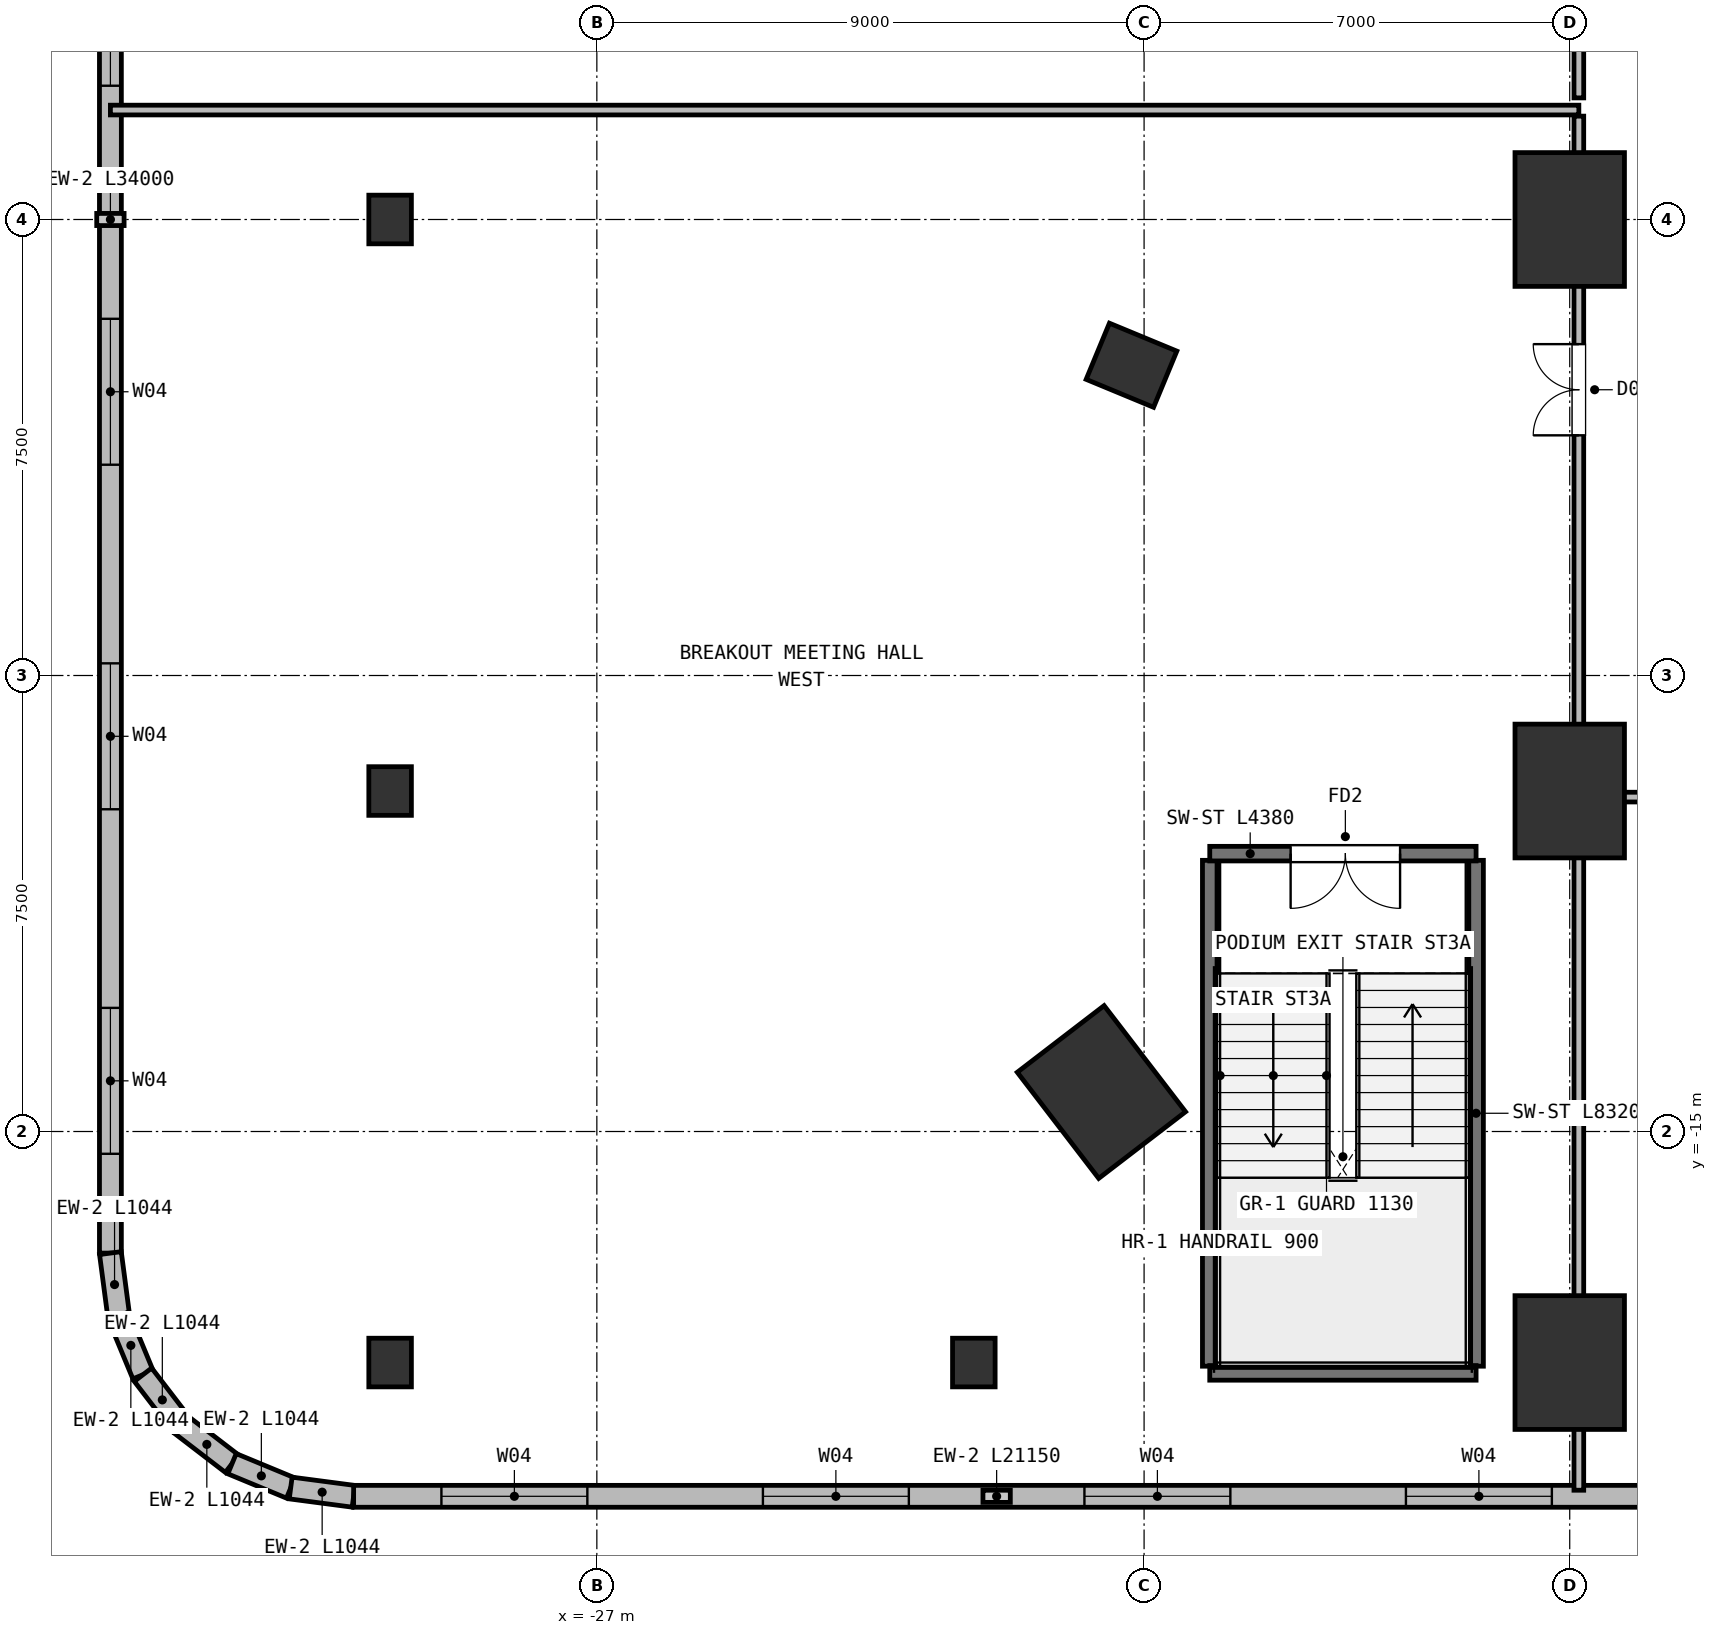
"""IFC4 building model, lengths in metres.
Left out: names, types, materials, properties, quantities, classifications, styles, units other than length and angle.
Written with IfcOpenShell. Run it as: python <this file> out.ifc"""

import sys

from ifc_helpers import new_model, si_unit, direction, frame, frame_2d, origin, origin_2d, place, context, subcontext, project, spatial, rectangle, extrude, element, fill, save


model = new_model("IFC4")
c1 = context("Model", 3, precision=1e-05, world=origin(), true_north=direction((0.0, 1.0)))
c2 = subcontext(c1, "Body", "Model", "MODEL_VIEW")
j1 = project(units=[si_unit("LENGTHUNIT", "METRE"), si_unit("PLANEANGLEUNIT", "RADIAN")], contexts=[c1])
p1 = place(None, origin())
s1 = spatial("IfcSite", under=j1, at=p1, CompositionType="ELEMENT")
p2 = place(p1, origin())
s2 = spatial("IfcBuilding", under=s1, at=p2, CompositionType="ELEMENT")
p3 = place(p2, frame((0.0, 0.0, 21.5)))
s3 = spatial("IfcBuildingStorey", under=s2, at=p3, CompositionType="ELEMENT", Elevation=21.5)
p4 = place(p3, frame((-18.207, -2.397, 0.0), z_axis=(0.0, 0.0, 1.0), x_axis=(0.382683432365, 0.923879532511, 0.0)))
e1 = element("IfcColumn", 1, at=p4, inside=s3, PredefinedType="COLUMN", context=c2, shape_type="SweptSolid", body=[
    extrude(rectangle(XDim=1.0, YDim=1.2, at=origin_2d()), origin(), (0.0, 0.0, 1.0), 4.5),
])
p5 = place(p3, frame((-18.702, -14.351, 0.0), z_axis=(0.0, 0.0, 1.0), x_axis=(0.793353340291, 0.608761429009, 0.0)))
e2 = element("IfcColumn", 2, at=p5, inside=s3, PredefinedType="COLUMN", context=c2, shape_type="SweptSolid", body=[
    extrude(rectangle(XDim=1.8, YDim=2.2, at=origin_2d()), origin(), (0.0, 0.0, 1.0), 4.5),
])
for number, where, z_axis, x_axis in (
    (3, (-30.4, -18.8, 0.0), (0.0, 0.0, 1.0), (1.0, 0.0, 0.0)),
    (4, (-30.4, -9.4, 0.0), (0.0, 0.0, 1.0), (1.0, 0.0, 0.0)),
    (5, (-30.4, 0.0, 0.0), (0.0, 0.0, 1.0), (1.0, 0.0, 0.0)),
    (6, (-20.8, -18.8, 0.0), (0.0, 0.0, 1.0), (1.0, 0.0, 0.0)),
):
    element("IfcColumn", number, at=place(p3, frame(where, z_axis=z_axis, x_axis=x_axis)), inside=s3, PredefinedType="COLUMN", context=c2, shape_type="SweptSolid", body=[
        extrude(rectangle(XDim=0.7, YDim=0.8, at=origin_2d()), origin(), (0.0, 0.0, 1.0), 4.5),
    ])
for number, where, z_axis, x_axis in (
    (7, (-11.0, -18.8, 0.0), (0.0, 0.0, 1.0), (1.0, 0.0, 0.0)),
    (8, (-11.0, -9.4, 0.0), (0.0, 0.0, 1.0), (1.0, 0.0, 0.0)),
    (9, (-11.0, 0.0, 0.0), (0.0, 0.0, 1.0), (1.0, 0.0, 0.0)),
):
    element("IfcColumn", number, at=place(p3, frame(where, z_axis=z_axis, x_axis=x_axis)), inside=s3, PredefinedType="COLUMN", context=c2, shape_type="SweptSolid", body=[
        extrude(rectangle(XDim=1.8, YDim=2.2, at=origin_2d()), origin(), (0.0, 0.0, 1.0), 4.5),
    ])
p6 = place(p3, frame((-35.0, -17.0, 0.0), z_axis=(0.0, 0.0, 1.0), x_axis=(0.0, 1.0, 0.0)))
e10 = element("IfcWall", 10, at=p6, inside=s3, PredefinedType="SOLIDWALL", context=c2, shape_type="SweptSolid", body=[
    extrude(rectangle(XDim=34.0, YDim=0.36, at=frame_2d((17.0, 0.0))), origin(), (0.0, 0.0, 1.0), 4.22),
])
p7 = place(p6, frame((1.633, 0.0, 0.95)))
e11 = element("IfcOpeningElement", 11, at=p7, cuts=e10, PredefinedType="OPENING", context=c2, shape_type="SweptSolid", body=[
    extrude(rectangle(XDim=2.4, YDim=2.6, at=frame_2d((1.2, 1.3))), frame((0.0, 0.19, 0.0), z_axis=(0.0, -1.0, 0.0), x_axis=(1.0, 0.0, 0.0)), (0.0, 0.0, 1.0), 0.38),
])
p8 = place(p6, frame((7.3, 0.0, 0.95)))
e12 = element("IfcOpeningElement", 12, at=p8, cuts=e10, PredefinedType="OPENING", context=c2, shape_type="SweptSolid", body=[
    extrude(rectangle(XDim=2.4, YDim=2.6, at=frame_2d((1.2, 1.3))), frame((0.0, 0.19, 0.0), z_axis=(0.0, -1.0, 0.0), x_axis=(1.0, 0.0, 0.0)), (0.0, 0.0, 1.0), 0.38),
])
p9 = place(p6, frame((12.967, 0.0, 0.95)))
e13 = element("IfcOpeningElement", 13, at=p9, cuts=e10, PredefinedType="OPENING", context=c2, shape_type="SweptSolid", body=[
    extrude(rectangle(XDim=2.4, YDim=2.6, at=frame_2d((1.2, 1.3))), frame((0.0, 0.19, 0.0), z_axis=(0.0, -1.0, 0.0), x_axis=(1.0, 0.0, 0.0)), (0.0, 0.0, 1.0), 0.38),
])
p10 = place(p6, frame((19.2, 0.0, 0.95)))
e14 = element("IfcOpeningElement", 14, at=p10, cuts=e10, PredefinedType="OPENING", context=c2, shape_type="SweptSolid", body=[
    extrude(rectangle(XDim=2.4, YDim=2.6, at=frame_2d((1.2, 1.3))), frame((0.0, 0.19, 0.0), z_axis=(0.0, -1.0, 0.0), x_axis=(1.0, 0.0, 0.0)), (0.0, 0.0, 1.0), 0.38),
])
p11 = place(p6, frame((24.3, 0.0, 0.95)))
e15 = element("IfcOpeningElement", 15, at=p11, cuts=e10, PredefinedType="OPENING", context=c2, shape_type="SweptSolid", body=[
    extrude(rectangle(XDim=2.4, YDim=2.6, at=frame_2d((1.2, 1.3))), frame((0.0, 0.19, 0.0), z_axis=(0.0, -1.0, 0.0), x_axis=(1.0, 0.0, 0.0)), (0.0, 0.0, 1.0), 0.38),
])
p12 = place(p6, frame((29.967, 0.0, 0.95)))
e16 = element("IfcOpeningElement", 16, at=p12, cuts=e10, PredefinedType="OPENING", context=c2, shape_type="SweptSolid", body=[
    extrude(rectangle(XDim=2.4, YDim=2.6, at=frame_2d((1.2, 1.3))), frame((0.0, 0.19, 0.0), z_axis=(0.0, -1.0, 0.0), x_axis=(1.0, 0.0, 0.0)), (0.0, 0.0, 1.0), 0.38),
])
p13 = place(p3, frame((-34.864, -18.035, 0.0), z_axis=(0.0, 0.0, 1.0), x_axis=(-0.130448465198, 0.991455091231, 0.0)))
e17 = element("IfcWall", 17, at=p13, inside=s3, PredefinedType="SOLIDWALL", context=c2, shape_type="SweptSolid", body=[
    extrude(rectangle(XDim=1.044, YDim=0.36, at=frame_2d((0.522, 0.0))), origin(), (0.0, 0.0, 1.0), 4.22),
])
for number, where, z_axis, x_axis in (
    (18, (-34.464, -19.0, 0.0), (0.0, 0.0, 1.0), (-0.383, 0.924, 0.0)),
    (19, (-33.828, -19.828, 0.0), (0.0, 0.0, 1.0), (-0.609, 0.793, 0.0)),
    (20, (-33.0, -20.464, 0.0), (0.0, 0.0, 1.0), (-0.793, 0.609, 0.0)),
    (21, (-32.035, -20.864, 0.0), (0.0, 0.0, 1.0), (-0.924, 0.383, 0.0)),
):
    element("IfcWall", number, at=place(p3, frame(where, z_axis=z_axis, x_axis=x_axis)), inside=s3, PredefinedType="SOLIDWALL", context=c2, shape_type="SweptSolid", body=[
        extrude(rectangle(XDim=1.044, YDim=0.36, at=frame_2d((0.522, 0.0))), origin(), (0.0, 0.0, 1.0), 4.22),
    ])
p14 = place(p3, frame((-31.0, -21.0, 0.0), z_axis=(0.0, 0.0, 1.0), x_axis=(-0.991455091231, 0.130448465198, 0.0)))
e22 = element("IfcWall", 22, at=p14, inside=s3, PredefinedType="SOLIDWALL", context=c2, shape_type="SweptSolid", body=[
    extrude(rectangle(XDim=1.044, YDim=0.36, at=frame_2d((0.522, 0.0))), origin(), (0.0, 0.0, 1.0), 4.22),
])
p15 = place(p3, frame((-9.85, -21.0, 0.0), z_axis=(0.0, 0.0, 1.0), x_axis=(-1.0, 0.0, 0.0)))
e23 = element("IfcWall", 23, at=p15, inside=s3, PredefinedType="SOLIDWALL", context=c2, shape_type="SweptSolid", body=[
    extrude(rectangle(XDim=21.15, YDim=0.36, at=frame_2d((10.575, 0.0))), origin(), (0.0, 0.0, 1.0), 4.22),
])
p16 = place(p15, frame((1.444, 0.0, 0.95)))
e24 = element("IfcOpeningElement", 24, at=p16, cuts=e23, PredefinedType="OPENING", context=c2, shape_type="SweptSolid", body=[
    extrude(rectangle(XDim=2.4, YDim=2.6, at=frame_2d((1.2, 1.3))), frame((0.0, 0.19, 0.0), z_axis=(0.0, -1.0, 0.0), x_axis=(1.0, 0.0, 0.0)), (0.0, 0.0, 1.0), 0.38),
])
p17 = place(p15, frame((6.731, 0.0, 0.95)))
e25 = element("IfcOpeningElement", 25, at=p17, cuts=e23, PredefinedType="OPENING", context=c2, shape_type="SweptSolid", body=[
    extrude(rectangle(XDim=2.4, YDim=2.6, at=frame_2d((1.2, 1.3))), frame((0.0, 0.19, 0.0), z_axis=(0.0, -1.0, 0.0), x_axis=(1.0, 0.0, 0.0)), (0.0, 0.0, 1.0), 0.38),
])
p18 = place(p15, frame((12.019, 0.0, 0.95)))
e26 = element("IfcOpeningElement", 26, at=p18, cuts=e23, PredefinedType="OPENING", context=c2, shape_type="SweptSolid", body=[
    extrude(rectangle(XDim=2.4, YDim=2.6, at=frame_2d((1.2, 1.3))), frame((0.0, 0.19, 0.0), z_axis=(0.0, -1.0, 0.0), x_axis=(1.0, 0.0, 0.0)), (0.0, 0.0, 1.0), 0.38),
])
p19 = place(p15, frame((17.306, 0.0, 0.95)))
e27 = element("IfcOpeningElement", 27, at=p19, cuts=e23, PredefinedType="OPENING", context=c2, shape_type="SweptSolid", body=[
    extrude(rectangle(XDim=2.4, YDim=2.6, at=frame_2d((1.2, 1.3))), frame((0.0, 0.19, 0.0), z_axis=(0.0, -1.0, 0.0), x_axis=(1.0, 0.0, 0.0)), (0.0, 0.0, 1.0), 0.38),
])
for number, where, z_axis, x_axis in (
    (28, (-16.92, -18.86, 0.0), (0.0, 0.0, 1.0), (0.0, 1.0, 0.0)),
    (29, (-12.54, -18.86, 0.0), (0.0, 0.0, 1.0), (0.0, 1.0, 0.0)),
):
    element("IfcWall", number, at=place(p3, frame(where, z_axis=z_axis, x_axis=x_axis)), inside=s3, PredefinedType="SHEAR", context=c2, shape_type="SweptSolid", body=[
        extrude(rectangle(XDim=8.32, YDim=0.24, at=frame_2d((4.16, 0.0))), origin(), (0.0, 0.0, 1.0), 4.22),
    ])
p20 = place(p3, frame((-16.92, -18.97, 0.0), z_axis=(0.0, 0.0, 1.0), x_axis=(1.0, 0.0, 0.0)))
e30 = element("IfcWall", 30, at=p20, inside=s3, PredefinedType="SHEAR", context=c2, shape_type="SweptSolid", body=[
    extrude(rectangle(XDim=4.38, YDim=0.24, at=frame_2d((2.19, 0.0))), origin(), (0.0, 0.0, 1.0), 4.22),
])
p21 = place(p3, frame((-12.54, -10.43, 0.0), z_axis=(0.0, 0.0, 1.0), x_axis=(-1.0, 0.0, 0.0)))
e31 = element("IfcWall", 31, at=p21, inside=s3, PredefinedType="SHEAR", context=c2, shape_type="SweptSolid", body=[
    extrude(rectangle(XDim=4.38, YDim=0.24, at=frame_2d((2.19, 0.0))), origin(), (0.0, 0.0, 1.0), 4.22),
])
p22 = place(p21, frame((1.25, 0.0, 0.0)))
e32 = element("IfcOpeningElement", 32, at=p22, cuts=e31, PredefinedType="OPENING", context=c2, shape_type="SweptSolid", body=[
    extrude(rectangle(XDim=1.8, YDim=2.2, at=frame_2d((0.9, 1.1))), frame((0.0, 0.13, 0.0), z_axis=(0.0, -1.0, 0.0), x_axis=(1.0, 0.0, 0.0)), (0.0, 0.0, 1.0), 0.26),
])
p23 = place(p3, frame((-10.85, 1.8, 0.0), z_axis=(0.0, 0.0, 1.0), x_axis=(-1.0, 0.0, 0.0)))
e33 = element("IfcWall", 33, at=p23, inside=s3, PredefinedType="PARTITIONING", context=c2, shape_type="SweptSolid", body=[
    extrude(rectangle(XDim=24.15, YDim=0.16, at=frame_2d((12.075, 0.0))), origin(), (0.0, 0.0, 1.0), 4.22),
])
p24 = place(p3, frame((-10.85, -20.9, 0.0), z_axis=(0.0, 0.0, 1.0), x_axis=(0.0, 1.0, 0.0)))
e34 = element("IfcWall", 34, at=p24, inside=s3, PredefinedType="PARTITIONING", context=c2, shape_type="SweptSolid", body=[
    extrude(rectangle(XDim=22.6, YDim=0.16, at=frame_2d((11.3, 0.0))), origin(), (0.0, 0.0, 1.0), 3.6),
])
p25 = place(p24, frame((17.35, 0.0, 0.0)))
e35 = element("IfcOpeningElement", 35, at=p25, cuts=e34, PredefinedType="OPENING", context=c2, shape_type="SweptSolid", body=[
    extrude(rectangle(XDim=1.5, YDim=2.2, at=frame_2d((0.75, 1.1))), frame((0.0, 0.09, 0.0), z_axis=(0.0, -1.0, 0.0), x_axis=(1.0, 0.0, 0.0)), (0.0, 0.0, 1.0), 0.18),
])
p26 = place(p3, frame((-10.85, 2.0, 0.0), z_axis=(0.0, 0.0, 1.0), x_axis=(0.0, 1.0, 0.0)))
e36 = element("IfcWall", 36, at=p26, inside=s3, PredefinedType="PARTITIONING", context=c2, shape_type="SweptSolid", body=[
    extrude(rectangle(XDim=18.9, YDim=0.16, at=frame_2d((9.45, 0.0))), origin(), (0.0, 0.0, 1.0), 3.6),
])
p27 = place(p26, frame((4.06, 0.0, 0.0)))
e37 = element("IfcOpeningElement", 37, at=p27, cuts=e36, PredefinedType="OPENING", context=c2, shape_type="SweptSolid", body=[
    extrude(rectangle(XDim=1.5, YDim=2.2, at=frame_2d((0.75, 1.1))), frame((0.0, 0.09, 0.0), z_axis=(0.0, -1.0, 0.0), x_axis=(1.0, 0.0, 0.0)), (0.0, 0.0, 1.0), 0.18),
])
p28 = place(p3, frame((10.75, -9.5, 0.0), z_axis=(0.0, 0.0, 1.0), x_axis=(-1.0, 0.0, 0.0)))
e38 = element("IfcWall", 38, at=p28, inside=s3, PredefinedType="PARTITIONING", context=c2, shape_type="SweptSolid", body=[
    extrude(rectangle(XDim=21.5, YDim=0.16, at=frame_2d((10.75, 0.0))), origin(), (0.0, 0.0, 1.0), 3.3),
])
p29 = place(p28, frame((13.8, 0.0, 0.0)))
e39 = element("IfcOpeningElement", 39, at=p29, cuts=e38, PredefinedType="OPENING", context=c2, shape_type="SweptSolid", body=[
    extrude(rectangle(XDim=1.5, YDim=2.2, at=frame_2d((0.75, 1.1))), frame((0.0, 0.09, 0.0), z_axis=(0.0, -1.0, 0.0), x_axis=(1.0, 0.0, 0.0)), (0.0, 0.0, 1.0), 0.18),
])
p30 = place(p7, origin())
e40 = element("IfcWindow", 40, at=p30, inside=s3, PartitioningType="SINGLE_PANEL", PredefinedType="WINDOW", context=c2, shape_type="SweptSolid", body=[
    extrude(rectangle(XDim=2.4, YDim=2.6, at=frame_2d((1.2, 1.3))), frame((0.0, 0.03, 0.0), z_axis=(0.0, -1.0, 0.0), x_axis=(1.0, 0.0, 0.0)), (0.0, 0.0, 1.0), 0.06),
])
fill(e11, e40)
p31 = place(p8, origin())
e41 = element("IfcWindow", 41, at=p31, inside=s3, PartitioningType="SINGLE_PANEL", PredefinedType="WINDOW", context=c2, shape_type="SweptSolid", body=[
    extrude(rectangle(XDim=2.4, YDim=2.6, at=frame_2d((1.2, 1.3))), frame((0.0, 0.03, 0.0), z_axis=(0.0, -1.0, 0.0), x_axis=(1.0, 0.0, 0.0)), (0.0, 0.0, 1.0), 0.06),
])
fill(e12, e41)
p32 = place(p9, origin())
e42 = element("IfcWindow", 42, at=p32, inside=s3, PartitioningType="SINGLE_PANEL", PredefinedType="WINDOW", context=c2, shape_type="SweptSolid", body=[
    extrude(rectangle(XDim=2.4, YDim=2.6, at=frame_2d((1.2, 1.3))), frame((0.0, 0.03, 0.0), z_axis=(0.0, -1.0, 0.0), x_axis=(1.0, 0.0, 0.0)), (0.0, 0.0, 1.0), 0.06),
])
fill(e13, e42)
p33 = place(p10, origin())
e43 = element("IfcWindow", 43, at=p33, inside=s3, PartitioningType="SINGLE_PANEL", PredefinedType="WINDOW", context=c2, shape_type="SweptSolid", body=[
    extrude(rectangle(XDim=2.4, YDim=2.6, at=frame_2d((1.2, 1.3))), frame((0.0, 0.03, 0.0), z_axis=(0.0, -1.0, 0.0), x_axis=(1.0, 0.0, 0.0)), (0.0, 0.0, 1.0), 0.06),
])
fill(e14, e43)
p34 = place(p16, origin())
e44 = element("IfcWindow", 44, at=p34, inside=s3, PartitioningType="SINGLE_PANEL", PredefinedType="WINDOW", context=c2, shape_type="SweptSolid", body=[
    extrude(rectangle(XDim=2.4, YDim=2.6, at=frame_2d((1.2, 1.3))), frame((0.0, 0.03, 0.0), z_axis=(0.0, -1.0, 0.0), x_axis=(1.0, 0.0, 0.0)), (0.0, 0.0, 1.0), 0.06),
])
fill(e24, e44)
p35 = place(p17, origin())
e45 = element("IfcWindow", 45, at=p35, inside=s3, PartitioningType="SINGLE_PANEL", PredefinedType="WINDOW", context=c2, shape_type="SweptSolid", body=[
    extrude(rectangle(XDim=2.4, YDim=2.6, at=frame_2d((1.2, 1.3))), frame((0.0, 0.03, 0.0), z_axis=(0.0, -1.0, 0.0), x_axis=(1.0, 0.0, 0.0)), (0.0, 0.0, 1.0), 0.06),
])
fill(e25, e45)
p36 = place(p18, origin())
e46 = element("IfcWindow", 46, at=p36, inside=s3, PartitioningType="SINGLE_PANEL", PredefinedType="WINDOW", context=c2, shape_type="SweptSolid", body=[
    extrude(rectangle(XDim=2.4, YDim=2.6, at=frame_2d((1.2, 1.3))), frame((0.0, 0.03, 0.0), z_axis=(0.0, -1.0, 0.0), x_axis=(1.0, 0.0, 0.0)), (0.0, 0.0, 1.0), 0.06),
])
fill(e26, e46)
p37 = place(p19, origin())
e47 = element("IfcWindow", 47, at=p37, inside=s3, PartitioningType="SINGLE_PANEL", PredefinedType="WINDOW", context=c2, shape_type="SweptSolid", body=[
    extrude(rectangle(XDim=2.4, YDim=2.6, at=frame_2d((1.2, 1.3))), frame((0.0, 0.03, 0.0), z_axis=(0.0, -1.0, 0.0), x_axis=(1.0, 0.0, 0.0)), (0.0, 0.0, 1.0), 0.06),
])
fill(e27, e47)
p38 = place(p22, origin())
e48 = element("IfcDoor", 48, at=p38, inside=s3, OperationType="DOUBLE_DOOR_SINGLE_SWING", PredefinedType="DOOR", context=c2, shape_type="SweptSolid", body=[
    extrude(rectangle(XDim=1.8, YDim=2.2, at=frame_2d((0.9, 1.1))), frame((0.0, 0.025, 0.0), z_axis=(0.0, -1.0, 0.0), x_axis=(1.0, 0.0, 0.0)), (0.0, 0.0, 1.0), 0.05),
])
fill(e32, e48)
p39 = place(p25, origin())
e49 = element("IfcDoor", 49, at=p39, inside=s3, OperationType="DOUBLE_DOOR_SINGLE_SWING", PredefinedType="DOOR", context=c2, shape_type="SweptSolid", body=[
    extrude(rectangle(XDim=1.5, YDim=2.2, at=frame_2d((0.75, 1.1))), frame((0.0, 0.025, 0.0), z_axis=(0.0, -1.0, 0.0), x_axis=(1.0, 0.0, 0.0)), (0.0, 0.0, 1.0), 0.05),
])
fill(e35, e49)
save(model, sys.argv[1])
